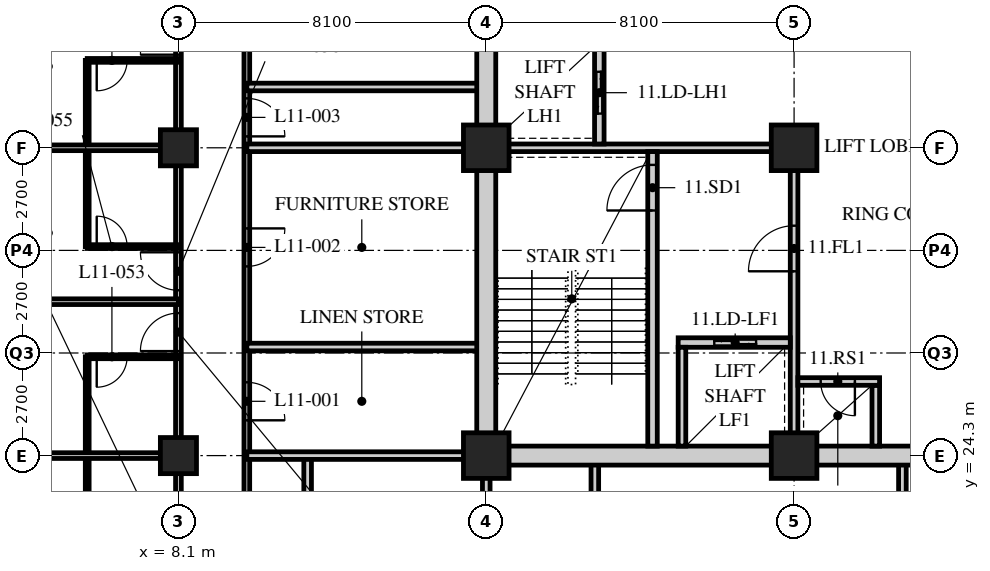
"""IFC4 building model, lengths in metres.
Left out: names, types, materials, properties, quantities, classifications, styles, units other than length and angle.
Written with IfcOpenShell. Run it as: python <this file> out.ifc"""

import sys

from ifc_helpers import new_model, si_unit, direction, frame, frame_2d, origin, origin_2d, place, context, subcontext, project, spatial, rectangle, hollow_rectangle, extrude, element, fill, save


model = new_model("IFC4")
c1 = context("Model", 3, precision=1e-05, world=origin(), true_north=direction((0.0, 1.0)))
c2 = subcontext(c1, "Body", "Model", "MODEL_VIEW")
j1 = project(units=[si_unit("LENGTHUNIT", "METRE"), si_unit("PLANEANGLEUNIT", "RADIAN")], contexts=[c1])
p1 = place(None, origin())
s1 = spatial("IfcSite", under=j1, at=p1, CompositionType="ELEMENT")
p2 = place(p1, origin())
s2 = spatial("IfcBuilding", under=s1, at=p2, CompositionType="ELEMENT")
p3 = place(p2, frame((0.0, 0.0, 50.0)))
s3 = spatial("IfcBuildingStorey", under=s2, at=p3, CompositionType="ELEMENT", Elevation=50.0)
for number, where, z_axis, x_axis in (
    (1, (8.1, 24.3, 0.0), (0.0, 0.0, 1.0), (1.0, 0.0, 0.0)),
    (2, (8.1, 32.4, 0.0), (0.0, 0.0, 1.0), (1.0, 0.0, 0.0)),
):
    element("IfcColumn", number, at=place(p3, frame(where, z_axis=z_axis, x_axis=x_axis)), inside=s3, PredefinedType="COLUMN", context=c2, shape_type="SweptSolid", body=[
        extrude(hollow_rectangle(XDim=0.95, YDim=0.95, WallThickness=0.095, at=origin_2d()), origin(), (0.0, 0.0, 1.0), 3.4),
    ])
for number, where, z_axis, x_axis in (
    (3, (16.2, 24.3, 0.0), (0.0, 0.0, 1.0), (1.0, 0.0, 0.0)),
    (4, (16.2, 32.4, 0.0), (0.0, 0.0, 1.0), (1.0, 0.0, 0.0)),
    (5, (24.3, 24.3, 0.0), (0.0, 0.0, 1.0), (1.0, 0.0, 0.0)),
    (6, (24.3, 32.4, 0.0), (0.0, 0.0, 1.0), (1.0, 0.0, 0.0)),
):
    element("IfcColumn", number, at=place(p3, frame(where, z_axis=z_axis, x_axis=x_axis)), inside=s3, PredefinedType="COLUMN", context=c2, shape_type="SweptSolid", body=[
        extrude(hollow_rectangle(XDim=1.2, YDim=1.2, WallThickness=0.12, at=origin_2d()), origin(), (0.0, 0.0, 1.0), 3.4),
    ])
p4 = place(p3, frame((8.1, 16.2, 0.0), z_axis=(0.0, 0.0, 1.0), x_axis=(0.0, 1.0, 0.0)))
e7 = element("IfcWall", 7, at=p4, inside=s3, PredefinedType="PARTITIONING", context=c2, shape_type="SweptSolid", body=[
    extrude(rectangle(XDim=26.1, YDim=0.15, at=frame_2d((13.05, 0.0))), origin(), (0.0, 0.0, 1.0), 2.578),
])
p5 = place(p4, frame((2.75, 0.0, 0.0)))
e8 = element("IfcOpeningElement", 8, at=p5, cuts=e7, PredefinedType="OPENING", context=c2, shape_type="SweptSolid", body=[
    extrude(rectangle(XDim=1.0, YDim=2.1, at=frame_2d((0.5, 1.05))), frame((0.0, 0.085, 0.0), z_axis=(0.0, -1.0, 0.0), x_axis=(1.0, 0.0, 0.0)), (0.0, 0.0, 1.0), 0.17),
])
p6 = place(p4, frame((4.35, 0.0, 0.0)))
e9 = element("IfcOpeningElement", 9, at=p6, cuts=e7, PredefinedType="OPENING", context=c2, shape_type="SweptSolid", body=[
    extrude(rectangle(XDim=1.0, YDim=2.1, at=frame_2d((0.5, 1.05))), frame((0.0, 0.085, 0.0), z_axis=(0.0, -1.0, 0.0), x_axis=(1.0, 0.0, 0.0)), (0.0, 0.0, 1.0), 0.17),
])
p7 = place(p4, frame((10.85, 0.0, 0.0)))
e10 = element("IfcOpeningElement", 10, at=p7, cuts=e7, PredefinedType="OPENING", context=c2, shape_type="SweptSolid", body=[
    extrude(rectangle(XDim=1.0, YDim=2.1, at=frame_2d((0.5, 1.05))), frame((0.0, 0.085, 0.0), z_axis=(0.0, -1.0, 0.0), x_axis=(1.0, 0.0, 0.0)), (0.0, 0.0, 1.0), 0.17),
])
p8 = place(p4, frame((12.45, 0.0, 0.0)))
e11 = element("IfcOpeningElement", 11, at=p8, cuts=e7, PredefinedType="OPENING", context=c2, shape_type="SweptSolid", body=[
    extrude(rectangle(XDim=1.0, YDim=2.1, at=frame_2d((0.5, 1.05))), frame((0.0, 0.085, 0.0), z_axis=(0.0, -1.0, 0.0), x_axis=(1.0, 0.0, 0.0)), (0.0, 0.0, 1.0), 0.17),
])
p9 = place(p4, frame((18.65, 0.0, 0.0)))
e12 = element("IfcOpeningElement", 12, at=p9, cuts=e7, PredefinedType="OPENING", context=c2, shape_type="SweptSolid", body=[
    extrude(rectangle(XDim=1.0, YDim=2.1, at=frame_2d((0.5, 1.05))), frame((0.0, 0.085, 0.0), z_axis=(0.0, -1.0, 0.0), x_axis=(1.0, 0.0, 0.0)), (0.0, 0.0, 1.0), 0.17),
])
p10 = place(p4, frame((22.7, 0.0, 0.0)))
e13 = element("IfcOpeningElement", 13, at=p10, cuts=e7, PredefinedType="OPENING", context=c2, shape_type="SweptSolid", body=[
    extrude(rectangle(XDim=1.0, YDim=2.1, at=frame_2d((0.5, 1.05))), frame((0.0, 0.085, 0.0), z_axis=(0.0, -1.0, 0.0), x_axis=(1.0, 0.0, 0.0)), (0.0, 0.0, 1.0), 0.17),
])
p11 = place(p3, frame((9.9, 40.5, 0.0), z_axis=(0.0, 0.0, 1.0), x_axis=(0.0, -1.0, 0.0)))
e14 = element("IfcWall", 14, at=p11, inside=s3, PredefinedType="PARTITIONING", context=c2, shape_type="SweptSolid", body=[
    extrude(rectangle(XDim=22.5, YDim=0.15, at=frame_2d((11.25, 0.0))), origin(), (0.0, 0.0, 1.0), 3.19),
])
p12 = place(p11, frame((14.271, 0.0, 0.0)))
e15 = element("IfcOpeningElement", 15, at=p12, cuts=e14, PredefinedType="OPENING", context=c2, shape_type="SweptSolid", body=[
    extrude(rectangle(XDim=1.0, YDim=2.1, at=frame_2d((0.5, 1.05))), frame((0.0, 0.085, 0.0), z_axis=(0.0, -1.0, 0.0), x_axis=(1.0, 0.0, 0.0)), (0.0, 0.0, 1.0), 0.17),
])
p13 = place(p11, frame((10.221, 0.0, 0.0)))
e16 = element("IfcOpeningElement", 16, at=p13, cuts=e14, PredefinedType="OPENING", context=c2, shape_type="SweptSolid", body=[
    extrude(rectangle(XDim=1.0, YDim=2.1, at=frame_2d((0.5, 1.05))), frame((0.0, 0.085, 0.0), z_axis=(0.0, -1.0, 0.0), x_axis=(1.0, 0.0, 0.0)), (0.0, 0.0, 1.0), 0.17),
])
p14 = place(p11, frame((6.8, 0.0, 0.0)))
e17 = element("IfcOpeningElement", 17, at=p14, cuts=e14, PredefinedType="OPENING", context=c2, shape_type="SweptSolid", body=[
    extrude(rectangle(XDim=1.0, YDim=2.1, at=frame_2d((0.5, 1.05))), frame((0.0, 0.085, 0.0), z_axis=(0.0, -1.0, 0.0), x_axis=(1.0, 0.0, 0.0)), (0.0, 0.0, 1.0), 0.17),
])
p15 = place(p11, frame((2.75, 0.0, 0.0)))
e18 = element("IfcOpeningElement", 18, at=p15, cuts=e14, PredefinedType="OPENING", context=c2, shape_type="SweptSolid", body=[
    extrude(rectangle(XDim=1.0, YDim=2.1, at=frame_2d((0.5, 1.05))), frame((0.0, 0.085, 0.0), z_axis=(0.0, -1.0, 0.0), x_axis=(1.0, 0.0, 0.0)), (0.0, 0.0, 1.0), 0.17),
])
p16 = place(p3, frame((9.9, 32.4, 0.0), z_axis=(0.0, 0.0, 1.0), x_axis=(1.0, 0.0, 0.0)))
e19 = element("IfcWall", 19, at=p16, inside=s3, PredefinedType="SOLIDWALL", context=c2, shape_type="SweptSolid", body=[
    extrude(rectangle(XDim=6.3, YDim=0.2, at=frame_2d((3.15, 0.0))), origin(), (0.0, 0.0, 1.0), 2.578),
])
for number, where, z_axis, x_axis in (
    (20, (9.9, 27.157, 0.0), (0.0, 0.0, 1.0), (1.0, 0.0, 0.0)),
    (21, (9.9, 34.0, 0.0), (0.0, 0.0, 1.0), (1.0, 0.0, 0.0)),
):
    element("IfcWall", number, at=place(p3, frame(where, z_axis=z_axis, x_axis=x_axis)), inside=s3, PredefinedType="SOLIDWALL", context=c2, shape_type="SweptSolid", body=[
        extrude(rectangle(XDim=6.3, YDim=0.2, at=frame_2d((3.15, 0.0))), origin(), (0.0, 0.0, 1.0), 3.19),
    ])
p17 = place(p3, frame((16.2, 18.0, 0.0), z_axis=(0.0, 0.0, 1.0), x_axis=(0.0, 1.0, 0.0)))
e22 = element("IfcWall", 22, at=p17, inside=s3, PredefinedType="SOLIDWALL", context=c2, shape_type="SweptSolid", body=[
    extrude(rectangle(XDim=6.3, YDim=0.2, at=frame_2d((3.15, 0.0))), origin(), (0.0, 0.0, 1.0), 2.578),
])
for number, where, z_axis, x_axis in (
    (23, (11.5, 18.0, 0.0), (0.0, 0.0, 1.0), (0.0, 1.0, 0.0)),
    (24, (19.057, 18.0, 0.0), (0.0, 0.0, 1.0), (0.0, 1.0, 0.0)),
    (25, (27.15, 18.0, 0.0), (0.0, 0.0, 1.0), (0.0, 1.0, 0.0)),
):
    element("IfcWall", number, at=place(p3, frame(where, z_axis=z_axis, x_axis=x_axis)), inside=s3, PredefinedType="SOLIDWALL", context=c2, shape_type="SweptSolid", body=[
        extrude(rectangle(XDim=6.3, YDim=0.2, at=frame_2d((3.15, 0.0))), origin(), (0.0, 0.0, 1.0), 3.19),
    ])
p18 = place(p3, frame((9.9, 24.3, 0.0), z_axis=(0.0, 0.0, 1.0), x_axis=(1.0, 0.0, 0.0)))
e26 = element("IfcWall", 26, at=p18, inside=s3, PredefinedType="SOLIDWALL", context=c2, shape_type="SweptSolid", body=[
    extrude(rectangle(XDim=6.3, YDim=0.2, at=frame_2d((3.15, 0.0))), origin(), (0.0, 0.0, 1.0), 2.578),
])
p19 = place(p3, frame((5.7, 21.7, 0.0), z_axis=(0.0, 0.0, 1.0), x_axis=(0.0, 1.0, 0.0)))
e27 = element("IfcWall", 27, at=p19, inside=s3, PredefinedType="PARTITIONING", context=c2, shape_type="SweptSolid", body=[
    extrude(rectangle(XDim=5.2, YDim=0.1, at=frame_2d((2.6, 0.0))), origin(), (0.0, 0.0, 1.0), 3.19),
])
p20 = place(p3, frame((8.1, 24.3, 0.0), z_axis=(0.0, 0.0, 1.0), x_axis=(-1.0, 0.0, 0.0)))
e28 = element("IfcWall", 28, at=p20, inside=s3, PredefinedType="PARTITIONING", context=c2, shape_type="SweptSolid", body=[
    extrude(rectangle(XDim=7.8, YDim=0.15, at=frame_2d((3.9, 0.0))), origin(), (0.0, 0.0, 1.0), 2.578),
])
p21 = place(p3, frame((8.1, 26.9, 0.0), z_axis=(0.0, 0.0, 1.0), x_axis=(-1.0, 0.0, 0.0)))
e29 = element("IfcWall", 29, at=p21, inside=s3, PredefinedType="PARTITIONING", context=c2, shape_type="SweptSolid", body=[
    extrude(rectangle(XDim=2.4, YDim=0.1, at=frame_2d((1.2, 0.0))), origin(), (0.0, 0.0, 1.0), 3.19),
])
p22 = place(p21, frame((1.35, 0.0, 0.0)))
e30 = element("IfcOpeningElement", 30, at=p22, cuts=e29, PredefinedType="OPENING", context=c2, shape_type="SweptSolid", body=[
    extrude(rectangle(XDim=0.8, YDim=2.1, at=frame_2d((0.4, 1.05))), frame((0.0, 0.06, 0.0), z_axis=(0.0, -1.0, 0.0), x_axis=(1.0, 0.0, 0.0)), (0.0, 0.0, 1.0), 0.12),
])
p23 = place(p3, frame((8.1, 28.35, 0.0), z_axis=(0.0, 0.0, 1.0), x_axis=(-1.0, 0.0, 0.0)))
e31 = element("IfcWall", 31, at=p23, inside=s3, PredefinedType="PARTITIONING", context=c2, shape_type="SweptSolid", body=[
    extrude(rectangle(XDim=7.8, YDim=0.15, at=frame_2d((3.9, 0.0))), origin(), (0.0, 0.0, 1.0), 3.19),
])
p24 = place(p3, frame((5.7, 29.8, 0.0), z_axis=(0.0, 0.0, 1.0), x_axis=(0.0, 1.0, 0.0)))
e32 = element("IfcWall", 32, at=p24, inside=s3, PredefinedType="PARTITIONING", context=c2, shape_type="SweptSolid", body=[
    extrude(rectangle(XDim=4.9, YDim=0.1, at=frame_2d((2.45, 0.0))), origin(), (0.0, 0.0, 1.0), 3.19),
])
p25 = place(p3, frame((8.1, 29.8, 0.0), z_axis=(0.0, 0.0, 1.0), x_axis=(-1.0, 0.0, 0.0)))
e33 = element("IfcWall", 33, at=p25, inside=s3, PredefinedType="PARTITIONING", context=c2, shape_type="SweptSolid", body=[
    extrude(rectangle(XDim=2.4, YDim=0.1, at=frame_2d((1.2, 0.0))), origin(), (0.0, 0.0, 1.0), 3.19),
])
p26 = place(p25, frame((1.35, 0.0, 0.0)))
e34 = element("IfcOpeningElement", 34, at=p26, cuts=e33, PredefinedType="OPENING", context=c2, shape_type="SweptSolid", body=[
    extrude(rectangle(XDim=0.8, YDim=2.1, at=frame_2d((0.4, 1.05))), frame((0.0, 0.06, 0.0), z_axis=(0.0, -1.0, 0.0), x_axis=(1.0, 0.0, 0.0)), (0.0, 0.0, 1.0), 0.12),
])
p27 = place(p3, frame((8.1, 32.4, 0.0), z_axis=(0.0, 0.0, 1.0), x_axis=(-1.0, 0.0, 0.0)))
e35 = element("IfcWall", 35, at=p27, inside=s3, PredefinedType="PARTITIONING", context=c2, shape_type="SweptSolid", body=[
    extrude(rectangle(XDim=7.8, YDim=0.15, at=frame_2d((3.9, 0.0))), origin(), (0.0, 0.0, 1.0), 2.578),
])
p28 = place(p3, frame((8.1, 34.7, 0.0), z_axis=(0.0, 0.0, 1.0), x_axis=(-1.0, 0.0, 0.0)))
e36 = element("IfcWall", 36, at=p28, inside=s3, PredefinedType="PARTITIONING", context=c2, shape_type="SweptSolid", body=[
    extrude(rectangle(XDim=2.4, YDim=0.1, at=frame_2d((1.2, 0.0))), origin(), (0.0, 0.0, 1.0), 3.19),
])
p29 = place(p28, frame((1.35, 0.0, 0.0)))
e37 = element("IfcOpeningElement", 37, at=p29, cuts=e36, PredefinedType="OPENING", context=c2, shape_type="SweptSolid", body=[
    extrude(rectangle(XDim=0.8, YDim=2.1, at=frame_2d((0.4, 1.05))), frame((0.0, 0.06, 0.0), z_axis=(0.0, -1.0, 0.0), x_axis=(1.0, 0.0, 0.0)), (0.0, 0.0, 1.0), 0.12),
])
p30 = place(p3, frame((15.95, 24.3, 0.0), z_axis=(0.0, 0.0, 1.0), x_axis=(1.0, 0.0, 0.0)))
e38 = element("IfcWall", 38, at=p30, inside=s3, PredefinedType="SOLIDWALL", context=c2, shape_type="SweptSolid", body=[
    extrude(rectangle(XDim=24.8, YDim=0.5, at=frame_2d((12.4, 0.0))), origin(), (0.0, 0.0, 1.0), 2.54),
])
p31 = place(p30, frame((11.5, 0.0, 0.0)))
e39 = element("IfcOpeningElement", 39, at=p31, cuts=e38, PredefinedType="OPENING", context=c2, shape_type="SweptSolid", body=[
    extrude(rectangle(XDim=1.8, YDim=2.4, at=frame_2d((0.9, 1.2))), frame((0.0, 0.26, 0.0), z_axis=(0.0, -1.0, 0.0), x_axis=(1.0, 0.0, 0.0)), (0.0, 0.0, 1.0), 0.52),
])
p32 = place(p3, frame((16.2, 24.55, 0.0), z_axis=(0.0, 0.0, 1.0), x_axis=(0.0, 1.0, 0.0)))
e40 = element("IfcWall", 40, at=p32, inside=s3, PredefinedType="SOLIDWALL", context=c2, shape_type="SweptSolid", body=[
    extrude(rectangle(XDim=15.7, YDim=0.5, at=frame_2d((7.85, 0.0))), origin(), (0.0, 0.0, 1.0), 2.578),
])
p33 = place(p3, frame((16.45, 32.4, 0.0), z_axis=(0.0, 0.0, 1.0), x_axis=(1.0, 0.0, 0.0)))
e41 = element("IfcWall", 41, at=p33, inside=s3, PredefinedType="SOLIDWALL", context=c2, shape_type="SweptSolid", body=[
    extrude(rectangle(XDim=7.95, YDim=0.2, at=frame_2d((3.975, 0.0))), origin(), (0.0, 0.0, 1.0), 2.578),
])
p34 = place(p3, frame((24.3, 24.55, 0.0), z_axis=(0.0, 0.0, 1.0), x_axis=(0.0, 1.0, 0.0)))
e42 = element("IfcWall", 42, at=p34, inside=s3, PredefinedType="SOLIDWALL", context=c2, shape_type="SweptSolid", body=[
    extrude(rectangle(XDim=7.75, YDim=0.2, at=frame_2d((3.875, 0.0))), origin(), (0.0, 0.0, 1.0), 2.578),
])
p35 = place(p34, frame((4.6, 0.0, 0.0)))
e43 = element("IfcOpeningElement", 43, at=p35, cuts=e42, PredefinedType="OPENING", context=c2, shape_type="SweptSolid", body=[
    extrude(rectangle(XDim=1.2, YDim=2.1, at=frame_2d((0.6, 1.05))), frame((0.0, 0.11, 0.0), z_axis=(0.0, -1.0, 0.0), x_axis=(1.0, 0.0, 0.0)), (0.0, 0.0, 1.0), 0.22),
])
p36 = place(p3, frame((20.575, 24.55, 0.0), z_axis=(0.0, 0.0, 1.0), x_axis=(0.0, 1.0, 0.0)))
e44 = element("IfcWall", 44, at=p36, inside=s3, PredefinedType="SOLIDWALL", context=c2, shape_type="SweptSolid", body=[
    extrude(rectangle(XDim=7.75, YDim=0.25, at=frame_2d((3.875, 0.0))), origin(), (0.0, 0.0, 1.0), 3.19),
])
p37 = place(p36, frame((6.2, 0.0, 0.0)))
e45 = element("IfcOpeningElement", 45, at=p37, cuts=e44, PredefinedType="OPENING", context=c2, shape_type="SweptSolid", body=[
    extrude(rectangle(XDim=1.2, YDim=2.1, at=frame_2d((0.6, 1.05))), frame((0.0, 0.135, 0.0), z_axis=(0.0, -1.0, 0.0), x_axis=(1.0, 0.0, 0.0)), (0.0, 0.0, 1.0), 0.27),
])
p38 = place(p3, frame((21.25, 27.275, 0.0), z_axis=(0.0, 0.0, 1.0), x_axis=(1.0, 0.0, 0.0)))
e46 = element("IfcWall", 46, at=p38, inside=s3, PredefinedType="SOLIDWALL", context=c2, shape_type="SweptSolid", body=[
    extrude(rectangle(XDim=2.95, YDim=0.25, at=frame_2d((1.475, 0.0))), origin(), (0.0, 0.0, 1.0), 3.19),
])
p39 = place(p38, frame((0.95, 0.0, 0.0)))
e47 = element("IfcOpeningElement", 47, at=p39, cuts=e46, PredefinedType="OPENING", context=c2, shape_type="SweptSolid", body=[
    extrude(rectangle(XDim=1.1, YDim=2.4, at=frame_2d((0.55, 1.2))), frame((0.0, 0.135, 0.0), z_axis=(0.0, -1.0, 0.0), x_axis=(1.0, 0.0, 0.0)), (0.0, 0.0, 1.0), 0.27),
])
p40 = place(p3, frame((21.35, 24.55, 0.0), z_axis=(0.0, 0.0, 1.0), x_axis=(0.0, 1.0, 0.0)))
e48 = element("IfcWall", 48, at=p40, inside=s3, PredefinedType="SOLIDWALL", context=c2, shape_type="SweptSolid", body=[
    extrude(rectangle(XDim=2.6, YDim=0.2, at=frame_2d((1.3, 0.0))), origin(), (0.0, 0.0, 1.0), 3.19),
])
p41 = place(p3, frame((19.175, 32.5, 0.0), z_axis=(0.0, 0.0, 1.0), x_axis=(0.0, 1.0, 0.0)))
e49 = element("IfcWall", 49, at=p41, inside=s3, PredefinedType="SOLIDWALL", context=c2, shape_type="SweptSolid", body=[
    extrude(rectangle(XDim=7.75, YDim=0.25, at=frame_2d((3.875, 0.0))), origin(), (0.0, 0.0, 1.0), 3.19),
])
p42 = place(p41, frame((0.8, 0.0, 0.0)))
e50 = element("IfcOpeningElement", 50, at=p42, cuts=e49, PredefinedType="OPENING", context=c2, shape_type="SweptSolid", body=[
    extrude(rectangle(XDim=1.1, YDim=2.4, at=frame_2d((0.55, 1.2))), frame((0.0, 0.135, 0.0), z_axis=(0.0, -1.0, 0.0), x_axis=(1.0, 0.0, 0.0)), (0.0, 0.0, 1.0), 0.27),
])
p43 = place(p41, frame((3.4, 0.0, 0.0)))
e51 = element("IfcOpeningElement", 51, at=p43, cuts=e49, PredefinedType="OPENING", context=c2, shape_type="SweptSolid", body=[
    extrude(rectangle(XDim=1.1, YDim=2.4, at=frame_2d((0.55, 1.2))), frame((0.0, 0.135, 0.0), z_axis=(0.0, -1.0, 0.0), x_axis=(1.0, 0.0, 0.0)), (0.0, 0.0, 1.0), 0.27),
])
p44 = place(p41, frame((6.0, 0.0, 0.0)))
e52 = element("IfcOpeningElement", 52, at=p44, cuts=e49, PredefinedType="OPENING", context=c2, shape_type="SweptSolid", body=[
    extrude(rectangle(XDim=1.1, YDim=2.4, at=frame_2d((0.55, 1.2))), frame((0.0, 0.135, 0.0), z_axis=(0.0, -1.0, 0.0), x_axis=(1.0, 0.0, 0.0)), (0.0, 0.0, 1.0), 0.27),
])
p45 = place(p3, frame((26.45, 24.55, 0.0), z_axis=(0.0, 0.0, 1.0), x_axis=(0.0, 1.0, 0.0)))
e53 = element("IfcWall", 53, at=p45, inside=s3, PredefinedType="SOLIDWALL", context=c2, shape_type="SweptSolid", body=[
    extrude(rectangle(XDim=1.6, YDim=0.2, at=frame_2d((0.8, 0.0))), origin(), (0.0, 0.0, 1.0), 3.19),
])
p46 = place(p3, frame((24.4, 26.25, 0.0), z_axis=(0.0, 0.0, 1.0), x_axis=(1.0, 0.0, 0.0)))
e54 = element("IfcWall", 54, at=p46, inside=s3, PredefinedType="SOLIDWALL", context=c2, shape_type="SweptSolid", body=[
    extrude(rectangle(XDim=2.15, YDim=0.2, at=frame_2d((1.075, 0.0))), origin(), (0.0, 0.0, 1.0), 3.19),
])
p47 = place(p46, frame((0.6, 0.0, 0.0)))
e55 = element("IfcOpeningElement", 55, at=p47, cuts=e54, PredefinedType="OPENING", context=c2, shape_type="SweptSolid", body=[
    extrude(rectangle(XDim=0.9, YDim=2.1, at=frame_2d((0.45, 1.05))), frame((0.0, 0.11, 0.0), z_axis=(0.0, -1.0, 0.0), x_axis=(1.0, 0.0, 0.0)), (0.0, 0.0, 1.0), 0.22),
])
p48 = place(p12, origin())
e56 = element("IfcDoor", 56, at=p48, inside=s3, OperationType="SINGLE_SWING_RIGHT", PredefinedType="DOOR", context=c2, shape_type="SweptSolid", body=[
    extrude(rectangle(XDim=1.0, YDim=2.1, at=frame_2d((0.5, 1.05))), frame((0.0, 0.025, 0.0), z_axis=(0.0, -1.0, 0.0), x_axis=(1.0, 0.0, 0.0)), (0.0, 0.0, 1.0), 0.05),
])
fill(e15, e56)
p49 = place(p13, origin())
e57 = element("IfcDoor", 57, at=p49, inside=s3, OperationType="SINGLE_SWING_LEFT", PredefinedType="DOOR", context=c2, shape_type="SweptSolid", body=[
    extrude(rectangle(XDim=1.0, YDim=2.1, at=frame_2d((0.5, 1.05))), frame((0.0, 0.025, 0.0), z_axis=(0.0, -1.0, 0.0), x_axis=(1.0, 0.0, 0.0)), (0.0, 0.0, 1.0), 0.05),
])
fill(e16, e57)
p50 = place(p14, origin())
e58 = element("IfcDoor", 58, at=p50, inside=s3, OperationType="SINGLE_SWING_RIGHT", PredefinedType="DOOR", context=c2, shape_type="SweptSolid", body=[
    extrude(rectangle(XDim=1.0, YDim=2.1, at=frame_2d((0.5, 1.05))), frame((0.0, 0.025, 0.0), z_axis=(0.0, -1.0, 0.0), x_axis=(1.0, 0.0, 0.0)), (0.0, 0.0, 1.0), 0.05),
])
fill(e17, e58)
p51 = place(p22, origin())
e59 = element("IfcDoor", 59, at=p51, inside=s3, OperationType="SINGLE_SWING_RIGHT", PredefinedType="DOOR", context=c2, shape_type="SweptSolid", body=[
    extrude(rectangle(XDim=0.8, YDim=2.1, at=frame_2d((0.4, 1.05))), frame((0.0, 0.025, 0.0), z_axis=(0.0, -1.0, 0.0), x_axis=(1.0, 0.0, 0.0)), (0.0, 0.0, 1.0), 0.05),
])
fill(e30, e59)
p52 = place(p7, origin())
e60 = element("IfcDoor", 60, at=p52, inside=s3, OperationType="SINGLE_SWING_LEFT", PredefinedType="DOOR", context=c2, shape_type="SweptSolid", body=[
    extrude(rectangle(XDim=1.0, YDim=2.1, at=frame_2d((0.5, 1.05))), frame((0.0, 0.025, 0.0), z_axis=(0.0, -1.0, 0.0), x_axis=(1.0, 0.0, 0.0)), (0.0, 0.0, 1.0), 0.05),
])
fill(e10, e60)
p53 = place(p26, origin())
e61 = element("IfcDoor", 61, at=p53, inside=s3, OperationType="SINGLE_SWING_LEFT", PredefinedType="DOOR", context=c2, shape_type="SweptSolid", body=[
    extrude(rectangle(XDim=0.8, YDim=2.1, at=frame_2d((0.4, 1.05))), frame((0.0, 0.025, 0.0), z_axis=(0.0, -1.0, 0.0), x_axis=(1.0, 0.0, 0.0)), (0.0, 0.0, 1.0), 0.05),
])
fill(e34, e61)
p54 = place(p8, origin())
e62 = element("IfcDoor", 62, at=p54, inside=s3, OperationType="SINGLE_SWING_RIGHT", PredefinedType="DOOR", context=c2, shape_type="SweptSolid", body=[
    extrude(rectangle(XDim=1.0, YDim=2.1, at=frame_2d((0.5, 1.05))), frame((0.0, 0.025, 0.0), z_axis=(0.0, -1.0, 0.0), x_axis=(1.0, 0.0, 0.0)), (0.0, 0.0, 1.0), 0.05),
])
fill(e11, e62)
p55 = place(p29, origin())
e63 = element("IfcDoor", 63, at=p55, inside=s3, OperationType="SINGLE_SWING_RIGHT", PredefinedType="DOOR", context=c2, shape_type="SweptSolid", body=[
    extrude(rectangle(XDim=0.8, YDim=2.1, at=frame_2d((0.4, 1.05))), frame((0.0, 0.025, 0.0), z_axis=(0.0, -1.0, 0.0), x_axis=(1.0, 0.0, 0.0)), (0.0, 0.0, 1.0), 0.05),
])
fill(e37, e63)
p56 = place(p9, origin())
e64 = element("IfcDoor", 64, at=p56, inside=s3, OperationType="SINGLE_SWING_LEFT", PredefinedType="DOOR", context=c2, shape_type="SweptSolid", body=[
    extrude(rectangle(XDim=1.0, YDim=2.1, at=frame_2d((0.5, 1.05))), frame((0.0, 0.025, 0.0), z_axis=(0.0, -1.0, 0.0), x_axis=(1.0, 0.0, 0.0)), (0.0, 0.0, 1.0), 0.05),
])
fill(e12, e64)
p57 = place(p37, origin())
e65 = element("IfcDoor", 65, at=p57, inside=s3, OperationType="SINGLE_SWING_LEFT", PredefinedType="DOOR", context=c2, shape_type="SweptSolid", body=[
    extrude(rectangle(XDim=1.2, YDim=2.1, at=frame_2d((0.6, 1.05))), frame((0.0, 0.025, 0.0), z_axis=(0.0, -1.0, 0.0), x_axis=(1.0, 0.0, 0.0)), (0.0, 0.0, 1.0), 0.05),
])
fill(e45, e65)
p58 = place(p35, origin())
e66 = element("IfcDoor", 66, at=p58, inside=s3, OperationType="SINGLE_SWING_LEFT", PredefinedType="DOOR", context=c2, shape_type="SweptSolid", body=[
    extrude(rectangle(XDim=1.2, YDim=2.1, at=frame_2d((0.6, 1.05))), frame((0.0, 0.025, 0.0), z_axis=(0.0, -1.0, 0.0), x_axis=(1.0, 0.0, 0.0)), (0.0, 0.0, 1.0), 0.05),
])
fill(e43, e66)
p59 = place(p47, origin())
e67 = element("IfcDoor", 67, at=p59, inside=s3, OperationType="SINGLE_SWING_LEFT", PredefinedType="DOOR", context=c2, shape_type="SweptSolid", body=[
    extrude(rectangle(XDim=0.9, YDim=2.1, at=frame_2d((0.45, 1.05))), frame((0.0, 0.025, 0.0), z_axis=(0.0, -1.0, 0.0), x_axis=(1.0, 0.0, 0.0)), (0.0, 0.0, 1.0), 0.05),
])
fill(e55, e67)
p60 = place(p42, origin())
e68 = element("IfcDoor", 68, at=p60, inside=s3, OperationType="DOUBLE_DOOR_SLIDING", PredefinedType="DOOR", context=c2, shape_type="SweptSolid", body=[
    extrude(rectangle(XDim=1.1, YDim=2.4, at=frame_2d((0.55, 1.2))), frame((0.0, 0.025, 0.0), z_axis=(0.0, -1.0, 0.0), x_axis=(1.0, 0.0, 0.0)), (0.0, 0.0, 1.0), 0.05),
])
fill(e50, e68)
p61 = place(p39, origin())
e69 = element("IfcDoor", 69, at=p61, inside=s3, OperationType="DOUBLE_DOOR_SLIDING", PredefinedType="DOOR", context=c2, shape_type="SweptSolid", body=[
    extrude(rectangle(XDim=1.1, YDim=2.4, at=frame_2d((0.55, 1.2))), frame((0.0, 0.025, 0.0), z_axis=(0.0, -1.0, 0.0), x_axis=(1.0, 0.0, 0.0)), (0.0, 0.0, 1.0), 0.05),
])
fill(e47, e69)
save(model, sys.argv[1])
